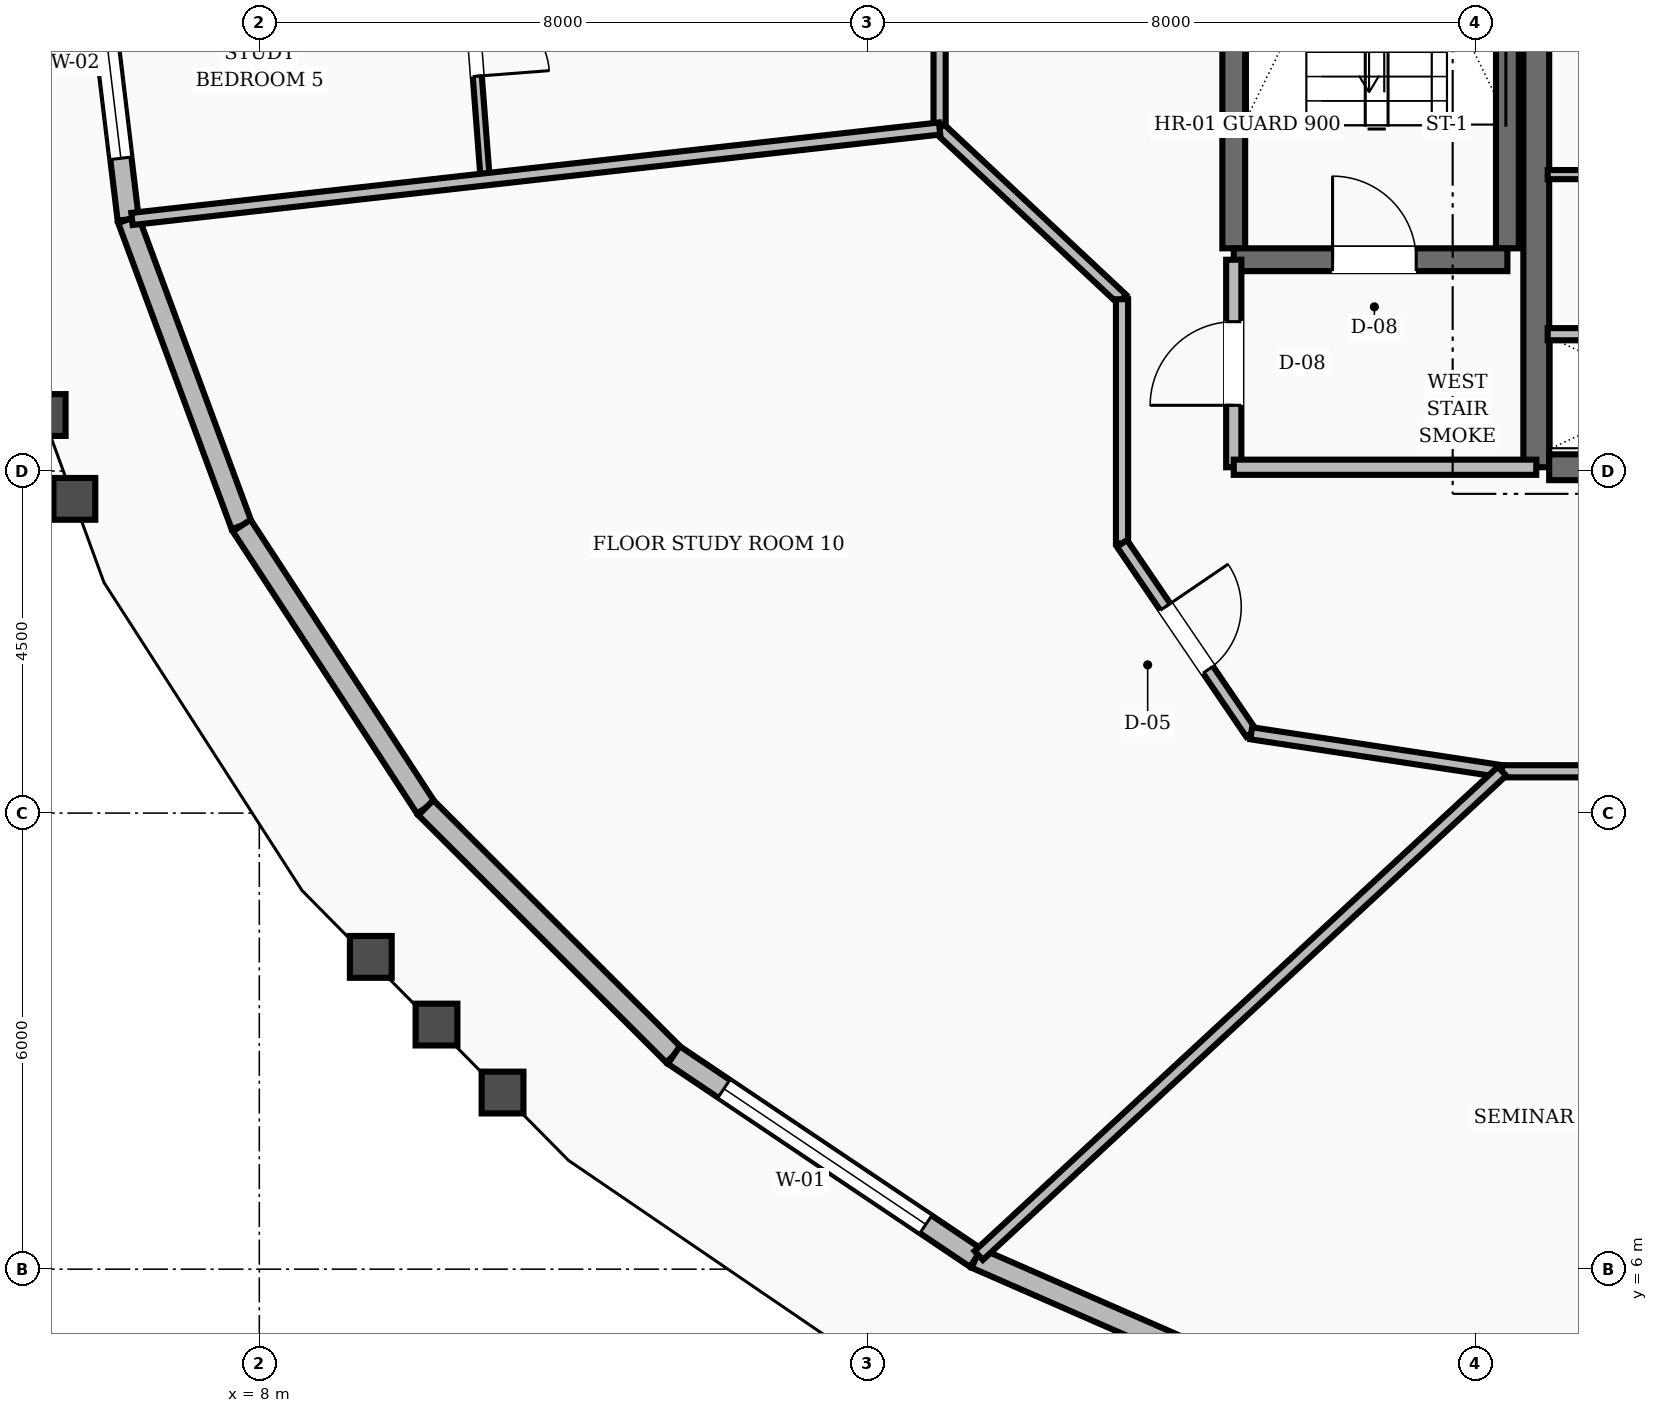
"""IFC4 building model, lengths in metres.
Left out: names, types, materials, properties, quantities, classifications, styles, units other than length and angle.
Written with IfcOpenShell. Run it as: python <this file> out.ifc"""

import sys

from ifc_helpers import new_model, si_unit, direction, frame, frame_2d, origin, place, context, subcontext, project, spatial, rectangle, extrude, element, fill, save


model = new_model("IFC4")
c1 = context("Model", 3, precision=1e-05, world=origin(), true_north=direction((0.0, 1.0)))
c2 = subcontext(c1, "Body", "Model", "MODEL_VIEW")
j1 = project(units=[si_unit("LENGTHUNIT", "METRE"), si_unit("PLANEANGLEUNIT", "RADIAN")], contexts=[c1])
p1 = place(None, origin())
s1 = spatial("IfcSite", under=j1, at=p1, CompositionType="ELEMENT")
p2 = place(p1, origin())
s2 = spatial("IfcBuilding", under=s1, at=p2, CompositionType="ELEMENT")
p3 = place(p2, frame((0.0, 0.0, 160.4)))
s3 = spatial("IfcBuildingStorey", under=s2, at=p3, CompositionType="ELEMENT", Elevation=160.4)
p4 = place(p3, frame((24.8, 16.55, 0.0), z_axis=(0.0, 0.0, 1.0), x_axis=(0.0, 1.0, 0.0)))
e1 = element("IfcWall", 1, at=p4, inside=s3, PredefinedType="SHEAR", context=c2, shape_type="SweptSolid", body=[
    extrude(rectangle(XDim=6.3, YDim=0.34, at=frame_2d((3.15, 0.0))), origin(), (0.0, 0.0, 1.0), 3.6),
])
p5 = place(p3, frame((24.97, 16.55, 0.0), z_axis=(0.0, 0.0, 1.0), x_axis=(1.0, 0.0, 0.0)))
e2 = element("IfcWall", 2, at=p5, inside=s3, PredefinedType="SHEAR", context=c2, shape_type="SweptSolid", body=[
    extrude(rectangle(XDim=3.23, YDim=0.34, at=frame_2d((1.615, 0.0))), origin(), (0.0, 0.0, 1.0), 3.6),
])
for number, where, z_axis, x_axis in (
    (3, (20.82, 19.43, 0.0), (0.0, 0.0, 1.0), (0.0, 1.0, 0.0)),
    (4, (24.42, 19.43, 0.0), (0.0, 0.0, 1.0), (0.0, 1.0, 0.0)),
):
    element("IfcWall", number, at=place(p3, frame(where, z_axis=z_axis, x_axis=x_axis)), inside=s3, PredefinedType="SHEAR", context=c2, shape_type="SweptSolid", body=[
        extrude(rectangle(XDim=8.74, YDim=0.3, at=frame_2d((4.37, 0.0))), origin(), (0.0, 0.0, 1.0), 3.6),
    ])
p6 = place(p3, frame((20.82, 19.28, 0.0), z_axis=(0.0, 0.0, 1.0), x_axis=(1.0, 0.0, 0.0)))
e5 = element("IfcWall", 5, at=p6, inside=s3, PredefinedType="SHEAR", context=c2, shape_type="SweptSolid", body=[
    extrude(rectangle(XDim=3.6, YDim=0.3, at=frame_2d((1.8, 0.0))), origin(), (0.0, 0.0, 1.0), 3.6),
])
p7 = place(p6, frame((1.3, 0.0, 0.0)))
e6 = element("IfcOpeningElement", 6, at=p7, cuts=e5, PredefinedType="OPENING", context=c2, shape_type="SweptSolid", body=[
    extrude(rectangle(XDim=1.1, YDim=2.1, at=frame_2d((0.55, 1.05))), frame((0.0, 0.16, 0.0), z_axis=(0.0, -1.0, 0.0), x_axis=(1.0, 0.0, 0.0)), (0.0, 0.0, 1.0), 0.32),
])
p8 = place(p3, frame((5.771, 24.0, 0.0), z_axis=(0.0, 0.0, 1.0), x_axis=(0.119432713673, -0.992842297097, 0.0)))
e7 = element("IfcWall", 7, at=p8, inside=s3, PredefinedType="STANDARD", context=c2, shape_type="SweptSolid", body=[
    extrude(rectangle(XDim=4.219, YDim=0.28, at=frame_2d((2.11, 0.0))), origin(), (0.0, 0.0, 1.0), 2.82),
])
p9 = place(p8, frame((0.81, 0.0, 0.8)))
e8 = element("IfcOpeningElement", 8, at=p9, cuts=e7, PredefinedType="OPENING", context=c2, shape_type="SweptSolid", body=[
    extrude(rectangle(XDim=2.6, YDim=1.65, at=frame_2d((1.3, 0.825))), frame((0.0, 0.15, 0.0), z_axis=(0.0, -1.0, 0.0), x_axis=(1.0, 0.0, 0.0)), (0.0, 0.0, 1.0), 0.3),
])
p10 = place(p3, frame((6.275, 19.811, 0.0), z_axis=(0.0, 0.0, 1.0), x_axis=(0.347427267509, -0.937706933851, 0.0)))
e9 = element("IfcWall", 9, at=p10, inside=s3, PredefinedType="STANDARD", context=c2, shape_type="SweptSolid", body=[
    extrude(rectangle(XDim=4.296, YDim=0.28, at=frame_2d((2.148, 0.0))), origin(), (0.0, 0.0, 1.0), 2.82),
])
p11 = place(p3, frame((7.768, 15.783, 0.0), z_axis=(0.0, 0.0, 1.0), x_axis=(0.546719569092, -0.837315778409, 0.0)))
e10 = element("IfcWall", 10, at=p11, inside=s3, PredefinedType="STANDARD", context=c2, shape_type="SweptSolid", body=[
    extrude(rectangle(XDim=4.433, YDim=0.28, at=frame_2d((2.217, 0.0))), origin(), (0.0, 0.0, 1.0), 2.82),
])
p12 = place(p3, frame((10.191, 12.071, 0.0), z_axis=(0.0, 0.0, 1.0), x_axis=(0.707980552396, -0.706231928922, 0.0)))
e11 = element("IfcWall", 11, at=p12, inside=s3, PredefinedType="STANDARD", context=c2, shape_type="SweptSolid", body=[
    extrude(rectangle(XDim=4.607, YDim=0.28, at=frame_2d((2.304, 0.0))), origin(), (0.0, 0.0, 1.0), 2.82),
])
p13 = place(p3, frame((13.453, 8.817, 0.0), z_axis=(0.0, 0.0, 1.0), x_axis=(0.830052550014, -0.557685183787, 0.0)))
e12 = element("IfcWall", 12, at=p13, inside=s3, PredefinedType="STANDARD", context=c2, shape_type="SweptSolid", body=[
    extrude(rectangle(XDim=4.788, YDim=0.28, at=frame_2d((2.394, 0.0))), origin(), (0.0, 0.0, 1.0), 2.82),
])
p14 = place(p13, frame((0.794, 0.0, 0.8)))
e13 = element("IfcOpeningElement", 13, at=p14, cuts=e12, PredefinedType="OPENING", context=c2, shape_type="SweptSolid", body=[
    extrude(rectangle(XDim=3.2, YDim=1.65, at=frame_2d((1.6, 0.825))), frame((0.0, 0.15, 0.0), z_axis=(0.0, -1.0, 0.0), x_axis=(1.0, 0.0, 0.0)), (0.0, 0.0, 1.0), 0.3),
])
p15 = place(p3, frame((17.428, 6.146, 0.0), z_axis=(0.0, 0.0, 1.0), x_axis=(0.916141485862, -0.400855058447, 0.0)))
e14 = element("IfcWall", 14, at=p15, inside=s3, PredefinedType="STANDARD", context=c2, shape_type="SweptSolid", body=[
    extrude(rectangle(XDim=4.95, YDim=0.28, at=frame_2d((2.475, 0.0))), origin(), (0.0, 0.0, 1.0), 2.82),
])
p16 = place(p3, frame((20.82, 16.55, 0.0), z_axis=(0.0, 0.0, 1.0), x_axis=(0.0, 1.0, 0.0)))
e15 = element("IfcWall", 15, at=p16, inside=s3, PredefinedType="SOLIDWALL", context=c2, shape_type="SweptSolid", body=[
    extrude(rectangle(XDim=2.73, YDim=0.2, at=frame_2d((1.365, 0.0))), origin(), (0.0, 0.0, 1.0), 2.8),
])
p17 = place(p16, frame((0.815, 0.0, 0.0)))
e16 = element("IfcOpeningElement", 16, at=p17, cuts=e15, PredefinedType="OPENING", context=c2, shape_type="SweptSolid", body=[
    extrude(rectangle(XDim=1.1, YDim=2.1, at=frame_2d((0.55, 1.05))), frame((0.0, 0.11, 0.0), z_axis=(0.0, -1.0, 0.0), x_axis=(1.0, 0.0, 0.0)), (0.0, 0.0, 1.0), 0.22),
])
p18 = place(p3, frame((20.82, 16.55, 0.0), z_axis=(0.0, 0.0, 1.0), x_axis=(1.0, 0.0, 0.0)))
e17 = element("IfcWall", 17, at=p18, inside=s3, PredefinedType="SOLIDWALL", context=c2, shape_type="SweptSolid", body=[
    extrude(rectangle(XDim=3.98, YDim=0.2, at=frame_2d((1.99, 0.0))), origin(), (0.0, 0.0, 1.0), 2.8),
])
p19 = place(p3, frame((24.95, 18.3, 0.0), z_axis=(0.0, 0.0, 1.0), x_axis=(1.0, 0.0, 0.0)))
e18 = element("IfcWall", 18, at=p19, inside=s3, PredefinedType="SOLIDWALL", context=c2, shape_type="SweptSolid", body=[
    extrude(rectangle(XDim=3.2, YDim=0.16, at=frame_2d((1.6, 0.0))), origin(), (0.0, 0.0, 1.0), 2.8),
])
p20 = place(p3, frame((24.95, 20.4, 0.0), z_axis=(0.0, 0.0, 1.0), x_axis=(1.0, 0.0, 0.0)))
e19 = element("IfcWall", 19, at=p20, inside=s3, PredefinedType="PARTITIONING", context=c2, shape_type="SweptSolid", body=[
    extrude(rectangle(XDim=3.2, YDim=0.12, at=frame_2d((1.6, 0.0))), origin(), (0.0, 0.0, 1.0), 2.8),
])
p21 = place(p20, frame((1.125, 0.0, 0.0)))
e20 = element("IfcOpeningElement", 20, at=p21, cuts=e19, PredefinedType="OPENING", context=c2, shape_type="SweptSolid", body=[
    extrude(rectangle(XDim=0.95, YDim=2.1, at=frame_2d((0.475, 1.05))), frame((0.0, 0.07, 0.0), z_axis=(0.0, -1.0, 0.0), x_axis=(1.0, 0.0, 0.0)), (0.0, 0.0, 1.0), 0.14),
])
p22 = place(p3, frame((16.95, 24.0, 0.0), z_axis=(0.0, 0.0, 1.0), x_axis=(0.0, -1.0, 0.0)))
e21 = element("IfcWall", 21, at=p22, inside=s3, PredefinedType="SOLIDWALL", context=c2, shape_type="SweptSolid", body=[
    extrude(rectangle(XDim=2.994, YDim=0.16, at=frame_2d((1.497, 0.0))), origin(), (0.0, 0.0, 1.0), 2.8),
])
p23 = place(p3, frame((16.95, 21.006, 0.0), z_axis=(0.0, 0.0, 1.0), x_axis=(0.730150682073, -0.683286163674, 0.0)))
e22 = element("IfcWall", 22, at=p23, inside=s3, PredefinedType="SOLIDWALL", context=c2, shape_type="SweptSolid", body=[
    extrude(rectangle(XDim=3.287, YDim=0.16, at=frame_2d((1.644, 0.0))), origin(), (0.0, 0.0, 1.0), 2.8),
])
p24 = place(p3, frame((19.35, 18.76, 0.0), z_axis=(0.0, 0.0, 1.0), x_axis=(0.0, -1.0, 0.0)))
e23 = element("IfcWall", 23, at=p24, inside=s3, PredefinedType="SOLIDWALL", context=c2, shape_type="SweptSolid", body=[
    extrude(rectangle(XDim=3.213, YDim=0.16, at=frame_2d((1.606, 0.0))), origin(), (0.0, 0.0, 1.0), 2.8),
])
p25 = place(p3, frame((19.35, 15.548, 0.0), z_axis=(0.0, 0.0, 1.0), x_axis=(0.562674669208, -0.826678423955, 0.0)))
e24 = element("IfcWall", 24, at=p25, inside=s3, PredefinedType="SOLIDWALL", context=c2, shape_type="SweptSolid", body=[
    extrude(rectangle(XDim=3.021, YDim=0.16, at=frame_2d((1.511, 0.0))), origin(), (0.0, 0.0, 1.0), 2.8),
])
p26 = place(p25, frame((1.01, 0.0, 0.0)))
e25 = element("IfcOpeningElement", 25, at=p26, cuts=e24, PredefinedType="OPENING", context=c2, shape_type="SweptSolid", body=[
    extrude(rectangle(XDim=1.0, YDim=2.1, at=frame_2d((0.5, 1.05))), frame((0.0, 0.09, 0.0), z_axis=(0.0, -1.0, 0.0), x_axis=(1.0, 0.0, 0.0)), (0.0, 0.0, 1.0), 0.18),
])
p27 = place(p3, frame((21.05, 13.05, 0.0), z_axis=(0.0, 0.0, 1.0), x_axis=(0.988710906508, -0.149835721217, 0.0)))
e26 = element("IfcWall", 26, at=p27, inside=s3, PredefinedType="SOLIDWALL", context=c2, shape_type="SweptSolid", body=[
    extrude(rectangle(XDim=3.337, YDim=0.16, at=frame_2d((1.668, 0.0))), origin(), (0.0, 0.0, 1.0), 2.8),
])
p28 = place(p3, frame((24.349, 12.55, 0.0), z_axis=(0.0, 0.0, 1.0), x_axis=(1.0, 0.0, 0.0)))
e27 = element("IfcWall", 27, at=p28, inside=s3, PredefinedType="SOLIDWALL", context=c2, shape_type="SweptSolid", body=[
    extrude(rectangle(XDim=2.908, YDim=0.16, at=frame_2d((1.454, 0.0))), origin(), (0.0, 0.0, 1.0), 2.8),
])
p29 = place(p3, frame((10.69, 24.0, 0.0), z_axis=(0.0, 0.0, 1.0), x_axis=(0.076818457189, -0.99704509659, 0.0)))
e28 = element("IfcWall", 28, at=p29, inside=s3, PredefinedType="PARTITIONING", context=c2, shape_type="SweptSolid", body=[
    extrude(rectangle(XDim=3.674, YDim=0.12, at=frame_2d((1.837, 0.0))), origin(), (0.0, 0.0, 1.0), 2.8),
])
p30 = place(p29, frame((1.362, 0.0, 0.0)))
e29 = element("IfcOpeningElement", 29, at=p30, cuts=e28, PredefinedType="OPENING", context=c2, shape_type="SweptSolid", body=[
    extrude(rectangle(XDim=0.95, YDim=2.1, at=frame_2d((0.475, 1.05))), frame((0.0, 0.07, 0.0), z_axis=(0.0, -1.0, 0.0), x_axis=(1.0, 0.0, 0.0)), (0.0, 0.0, 1.0), 0.14),
])
p31 = place(p3, frame((16.95, 21.006, 0.0), z_axis=(0.0, 0.0, 1.0), x_axis=(-0.993789528527, -0.111276111501, 0.0)))
e30 = element("IfcWall", 30, at=p31, inside=s3, PredefinedType="SOLIDWALL", context=c2, shape_type="SweptSolid", body=[
    extrude(rectangle(XDim=10.691, YDim=0.16, at=frame_2d((5.346, 0.0))), origin(), (0.0, 0.0, 1.0), 2.8),
])
p32 = place(p3, frame((24.349, 12.55, 0.0), z_axis=(0.0, 0.0, 1.0), x_axis=(-0.734022554493, -0.679125091199, 0.0)))
e31 = element("IfcWall", 31, at=p32, inside=s3, PredefinedType="SOLIDWALL", context=c2, shape_type="SweptSolid", body=[
    extrude(rectangle(XDim=9.379, YDim=0.16, at=frame_2d((4.689, 0.0))), origin(), (0.0, 0.0, 1.0), 2.8),
])
p33 = place(p9, origin())
e32 = element("IfcWindow", 32, at=p33, inside=s3, PartitioningType="SINGLE_PANEL", PredefinedType="WINDOW", context=c2, shape_type="SweptSolid", body=[
    extrude(rectangle(XDim=2.6, YDim=1.65, at=frame_2d((1.3, 0.825))), frame((0.0, 0.03, 0.0), z_axis=(0.0, -1.0, 0.0), x_axis=(1.0, 0.0, 0.0)), (0.0, 0.0, 1.0), 0.06),
])
fill(e8, e32)
p34 = place(p14, origin())
e33 = element("IfcWindow", 33, at=p34, inside=s3, PartitioningType="SINGLE_PANEL", PredefinedType="WINDOW", context=c2, shape_type="SweptSolid", body=[
    extrude(rectangle(XDim=3.2, YDim=1.65, at=frame_2d((1.6, 0.825))), frame((0.0, 0.03, 0.0), z_axis=(0.0, -1.0, 0.0), x_axis=(1.0, 0.0, 0.0)), (0.0, 0.0, 1.0), 0.06),
])
fill(e13, e33)
p35 = place(p7, origin())
e34 = element("IfcDoor", 34, at=p35, inside=s3, OperationType="SINGLE_SWING_LEFT", PredefinedType="DOOR", context=c2, shape_type="SweptSolid", body=[
    extrude(rectangle(XDim=1.1, YDim=2.1, at=frame_2d((0.55, 1.05))), frame((0.0, 0.025, 0.0), z_axis=(0.0, -1.0, 0.0), x_axis=(1.0, 0.0, 0.0)), (0.0, 0.0, 1.0), 0.05),
])
fill(e6, e34)
p36 = place(p17, origin())
e35 = element("IfcDoor", 35, at=p36, inside=s3, OperationType="SINGLE_SWING_LEFT", PredefinedType="DOOR", context=c2, shape_type="SweptSolid", body=[
    extrude(rectangle(XDim=1.1, YDim=2.1, at=frame_2d((0.55, 1.05))), frame((0.0, 0.025, 0.0), z_axis=(0.0, -1.0, 0.0), x_axis=(1.0, 0.0, 0.0)), (0.0, 0.0, 1.0), 0.05),
])
fill(e16, e35)
p37 = place(p30, origin())
e36 = element("IfcDoor", 36, at=p37, inside=s3, OperationType="SINGLE_SWING_RIGHT", PredefinedType="DOOR", context=c2, shape_type="SweptSolid", body=[
    extrude(rectangle(XDim=0.95, YDim=2.1, at=frame_2d((0.475, 1.05))), frame((0.0, 0.025, 0.0), z_axis=(0.0, -1.0, 0.0), x_axis=(1.0, 0.0, 0.0)), (0.0, 0.0, 1.0), 0.05),
])
fill(e29, e36)
p38 = place(p26, origin())
e37 = element("IfcDoor", 37, at=p38, inside=s3, OperationType="SINGLE_SWING_LEFT", PredefinedType="DOOR", context=c2, shape_type="SweptSolid", body=[
    extrude(rectangle(XDim=1.0, YDim=2.1, at=frame_2d((0.5, 1.05))), frame((0.0, 0.025, 0.0), z_axis=(0.0, -1.0, 0.0), x_axis=(1.0, 0.0, 0.0)), (0.0, 0.0, 1.0), 0.05),
])
fill(e25, e37)
save(model, sys.argv[1])
